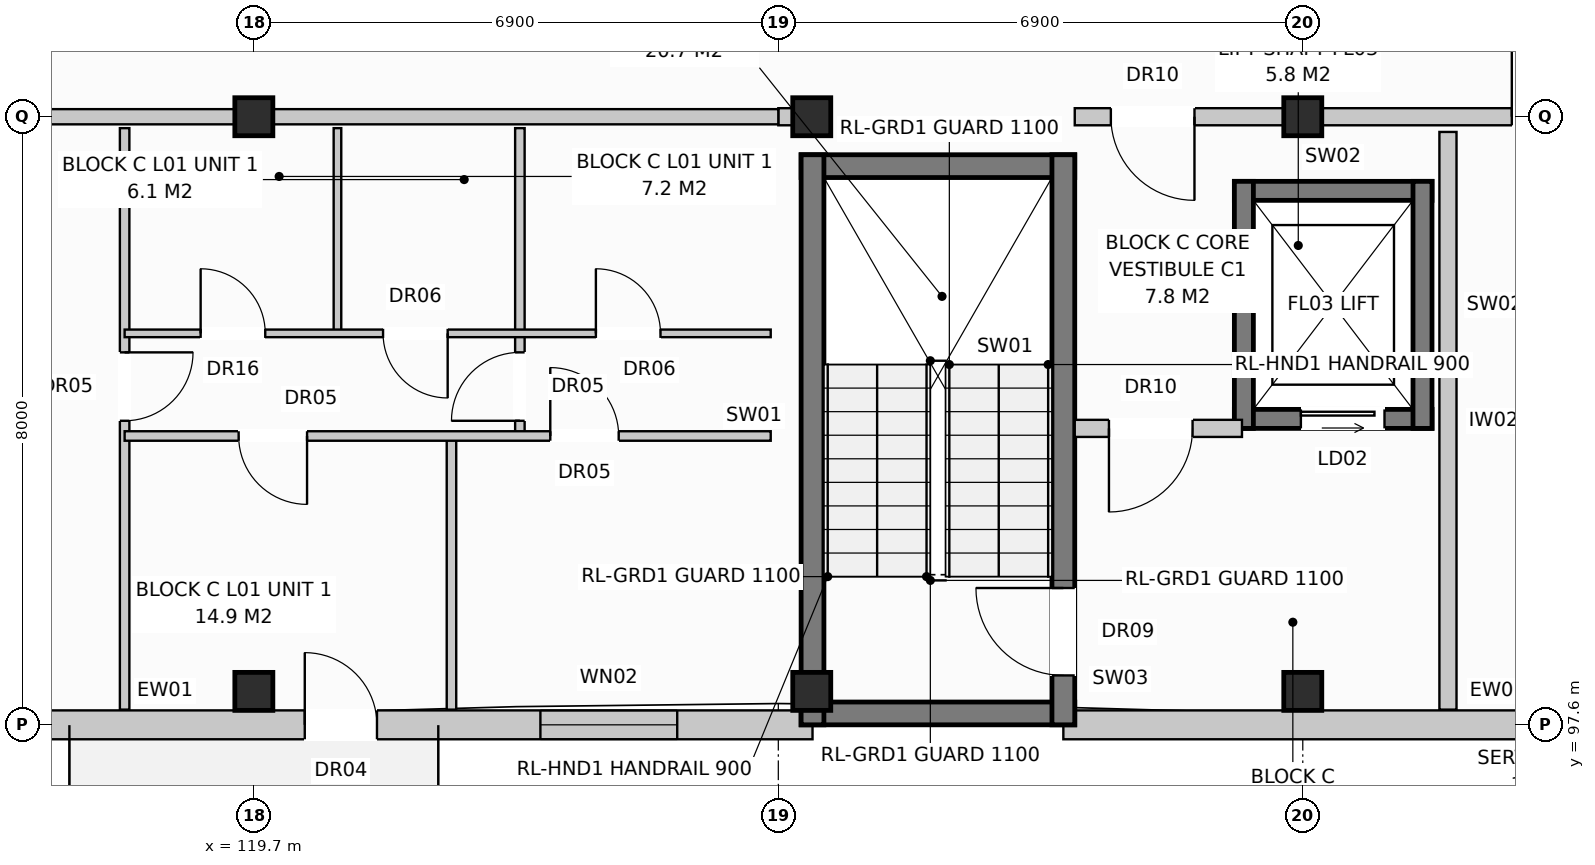
"""IFC4 building model, lengths in metres.
Left out: names, types, materials, properties, quantities, classifications, styles, units other than length and angle.
Written with IfcOpenShell. Run it as: python <this file> out.ifc"""

import sys

from ifc_helpers import new_model, si_unit, direction, frame, frame_2d, origin, origin_with_axes, origin_2d, place, context, subcontext, project, spatial, rectangle, extrude, element, fill, save


model = new_model("IFC4")
c1 = context("Model", 3, precision=1e-05, world=origin(), true_north=direction((0.0, 1.0)))
c2 = subcontext(c1, "Body", "Model", "MODEL_VIEW")
j1 = project(units=[si_unit("LENGTHUNIT", "METRE"), si_unit("PLANEANGLEUNIT", "RADIAN")], contexts=[c1])
p1 = place(None, origin())
s1 = spatial("IfcSite", under=j1, at=p1, CompositionType="ELEMENT")
p2 = place(p1, origin())
s2 = spatial("IfcBuilding", under=s1, at=p2, CompositionType="ELEMENT")
p3 = place(p2, frame((0.0, 0.0, 4.4)))
s3 = spatial("IfcBuildingStorey", under=s2, at=p3, CompositionType="ELEMENT", Elevation=4.4)
for number, where, z_axis, x_axis in (
    (1, (119.7, 98.04, 0.0), (0.0, 0.0, 1.0), (1.0, 0.0, 0.0)),
    (2, (119.7, 105.6, 0.0), (0.0, 0.0, 1.0), (1.0, 0.0, 0.0)),
    (3, (127.04, 98.04, 0.0), (0.0, 0.0, 1.0), (1.0, 0.0, 0.0)),
    (4, (127.04, 105.6, 0.0), (0.0, 0.0, 1.0), (1.0, 0.0, 0.0)),
    (5, (133.5, 98.04, 0.0), (0.0, 0.0, 1.0), (1.0, 0.0, 0.0)),
    (6, (133.5, 105.6, 0.0), (0.0, 0.0, 1.0), (1.0, 0.0, 0.0)),
):
    element("IfcColumn", number, at=place(p3, frame(where, z_axis=z_axis, x_axis=x_axis)), inside=s3, PredefinedType="COLUMN", context=c2, shape_type="SweptSolid", body=[
        extrude(rectangle(XDim=0.5, YDim=0.5, at=origin_2d()), origin(), (0.0, 0.0, 1.0), 3.6),
    ])
p4 = place(p3, frame((112.98, 97.6, 0.0), z_axis=(0.0, 0.0, 1.0), x_axis=(1.0, 0.0, 0.0)))
e7 = element("IfcWall", 7, at=p4, inside=s3, PredefinedType="STANDARD", context=c2, shape_type="SweptSolid", body=[
    extrude(rectangle(XDim=14.07, YDim=0.38, at=frame_2d((7.035, 0.0))), origin(), (0.0, 0.0, 1.0), 3.33),
])
p5 = place(p4, frame((7.39, 0.0, 0.0)))
e8 = element("IfcOpeningElement", 8, at=p5, cuts=e7, PredefinedType="OPENING", context=c2, shape_type="SweptSolid", body=[
    extrude(rectangle(XDim=0.95, YDim=2.1, at=frame_2d((0.475, 1.05))), frame((0.0, 0.202, 0.0), z_axis=(0.0, -1.0, 0.0), x_axis=(1.0, 0.0, 0.0)), (0.0, 0.0, 1.0), 0.404),
])
p6 = place(p4, frame((1.515, 0.0, 0.8)))
e9 = element("IfcOpeningElement", 9, at=p6, cuts=e7, PredefinedType="OPENING", context=c2, shape_type="SweptSolid", body=[
    extrude(rectangle(XDim=1.95, YDim=1.65, at=frame_2d((0.975, 0.825))), frame((0.0, 0.202, 0.0), z_axis=(0.0, -1.0, 0.0), x_axis=(1.0, 0.0, 0.0)), (0.0, 0.0, 1.0), 0.404),
])
p7 = place(p4, frame((10.49, 0.0, 0.8)))
e10 = element("IfcOpeningElement", 10, at=p7, cuts=e7, PredefinedType="OPENING", context=c2, shape_type="SweptSolid", body=[
    extrude(rectangle(XDim=1.8, YDim=1.7, at=frame_2d((0.9, 0.85))), frame((0.0, 0.202, 0.0), z_axis=(0.0, -1.0, 0.0), x_axis=(1.0, 0.0, 0.0)), (0.0, 0.0, 1.0), 0.404),
])
p8 = place(p3, frame((130.35, 97.6, 0.0), z_axis=(0.0, 0.0, 1.0), x_axis=(1.0, 0.0, 0.0)))
e11 = element("IfcWall", 11, at=p8, inside=s3, PredefinedType="STANDARD", context=c2, shape_type="SweptSolid", body=[
    extrude(rectangle(XDim=17.4, YDim=0.38, at=frame_2d((8.7, 0.0))), origin(), (0.0, 0.0, 1.0), 3.33),
])
p9 = place(p8, frame((11.892, 0.0, 0.0)))
e12 = element("IfcOpeningElement", 12, at=p9, cuts=e11, PredefinedType="OPENING", context=c2, shape_type="SweptSolid", body=[
    extrude(rectangle(XDim=0.95, YDim=2.1, at=frame_2d((0.475, 1.05))), frame((0.0, 0.202, 0.0), z_axis=(0.0, -1.0, 0.0), x_axis=(1.0, 0.0, 0.0)), (0.0, 0.0, 1.0), 0.404),
])
p10 = place(p8, frame((10.62, 0.0, 0.9)))
e13 = element("IfcOpeningElement", 13, at=p10, cuts=e11, PredefinedType="OPENING", context=c2, shape_type="SweptSolid", body=[
    extrude(rectangle(XDim=0.95, YDim=1.55, at=frame_2d((0.475, 0.775))), frame((0.0, 0.202, 0.0), z_axis=(0.0, -1.0, 0.0), x_axis=(1.0, 0.0, 0.0)), (0.0, 0.0, 1.0), 0.404),
])
p11 = place(p8, frame((14.548, 0.0, 0.8)))
e14 = element("IfcOpeningElement", 14, at=p11, cuts=e11, PredefinedType="OPENING", context=c2, shape_type="SweptSolid", body=[
    extrude(rectangle(XDim=1.95, YDim=1.65, at=frame_2d((0.975, 0.825))), frame((0.0, 0.202, 0.0), z_axis=(0.0, -1.0, 0.0), x_axis=(1.0, 0.0, 0.0)), (0.0, 0.0, 1.0), 0.404),
])
for number, where, z_axis, x_axis in (
    (15, (126.9, 97.75, 0.0), (0.0, 0.0, 1.0), (1.0, 0.0, 0.0)),
    (16, (126.9, 104.95, 0.0), (0.0, 0.0, 1.0), (1.0, 0.0, 0.0)),
):
    element("IfcWall", number, at=place(p3, frame(where, z_axis=z_axis, x_axis=x_axis)), inside=s3, PredefinedType="SHEAR", context=c2, shape_type="SweptSolid", body=[
        extrude(rectangle(XDim=3.6, YDim=0.3, at=frame_2d((1.8, 0.0))), origin(), (0.0, 0.0, 1.0), 3.33),
    ])
p12 = place(p3, frame((127.05, 97.6, 0.0), z_axis=(0.0, 0.0, 1.0), x_axis=(0.0, 1.0, 0.0)))
e17 = element("IfcWall", 17, at=p12, inside=s3, PredefinedType="SHEAR", context=c2, shape_type="SweptSolid", body=[
    extrude(rectangle(XDim=7.5, YDim=0.3, at=frame_2d((3.75, 0.0))), origin(), (0.0, 0.0, 1.0), 3.33),
])
p13 = place(p3, frame((130.35, 97.6, 0.0), z_axis=(0.0, 0.0, 1.0), x_axis=(0.0, 1.0, 0.0)))
e18 = element("IfcWall", 18, at=p13, inside=s3, PredefinedType="SHEAR", context=c2, shape_type="SweptSolid", body=[
    extrude(rectangle(XDim=7.5, YDim=0.3, at=frame_2d((3.75, 0.0))), origin(), (0.0, 0.0, 1.0), 3.33),
])
p14 = place(p13, frame((0.65, 0.0, 0.0)))
e19 = element("IfcOpeningElement", 19, at=p14, cuts=e18, PredefinedType="OPENING", context=c2, shape_type="SweptSolid", body=[
    extrude(rectangle(XDim=1.15, YDim=2.15, at=frame_2d((0.575, 1.075))), frame((0.0, 0.162, 0.0), z_axis=(0.0, -1.0, 0.0), x_axis=(1.0, 0.0, 0.0)), (0.0, 0.0, 1.0), 0.324),
])
p15 = place(p3, frame((132.6, 101.625, 0.0), z_axis=(0.0, 0.0, 1.0), x_axis=(1.0, 0.0, 0.0)))
e20 = element("IfcWall", 20, at=p15, inside=s3, PredefinedType="SHEAR", context=c2, shape_type="SweptSolid", body=[
    extrude(rectangle(XDim=2.6, YDim=0.25, at=frame_2d((1.3, 0.0))), origin(), (0.0, 0.0, 1.0), 3.33),
])
p16 = place(p15, frame((0.875, 0.0, 0.0)))
e21 = element("IfcOpeningElement", 21, at=p16, cuts=e20, PredefinedType="OPENING", context=c2, shape_type="SweptSolid", body=[
    extrude(rectangle(XDim=1.1, YDim=2.1, at=frame_2d((0.55, 1.05))), frame((0.0, 0.137, 0.0), z_axis=(0.0, -1.0, 0.0), x_axis=(1.0, 0.0, 0.0)), (0.0, 0.0, 1.0), 0.274),
])
p17 = place(p3, frame((132.6, 104.625, 0.0), z_axis=(0.0, 0.0, 1.0), x_axis=(1.0, 0.0, 0.0)))
e22 = element("IfcWall", 22, at=p17, inside=s3, PredefinedType="SHEAR", context=c2, shape_type="SweptSolid", body=[
    extrude(rectangle(XDim=2.6, YDim=0.25, at=frame_2d((1.3, 0.0))), origin(), (0.0, 0.0, 1.0), 3.33),
])
for number, where, z_axis, x_axis in (
    (23, (132.725, 101.5, 0.0), (0.0, 0.0, 1.0), (0.0, 1.0, 0.0)),
    (24, (135.075, 101.5, 0.0), (0.0, 0.0, 1.0), (0.0, 1.0, 0.0)),
):
    element("IfcWall", number, at=place(p3, frame(where, z_axis=z_axis, x_axis=x_axis)), inside=s3, PredefinedType="SHEAR", context=c2, shape_type="SweptSolid", body=[
        extrude(rectangle(XDim=3.25, YDim=0.25, at=frame_2d((1.625, 0.0))), origin(), (0.0, 0.0, 1.0), 3.33),
    ])
p18 = place(p3, frame((135.41, 97.8, 0.0), z_axis=(0.0, 0.0, 1.0), x_axis=(0.0, 1.0, 0.0)))
e25 = element("IfcWall", 25, at=p18, inside=s3, PredefinedType="PARTITIONING", context=c2, shape_type="SweptSolid", body=[
    extrude(rectangle(XDim=7.6, YDim=0.225, at=frame_2d((3.8, 0.0))), origin(), (0.0, 0.0, 1.0), 2.99),
])
p19 = place(p3, frame((130.5, 101.5, 0.0), z_axis=(0.0, 0.0, 1.0), x_axis=(1.0, 0.0, 0.0)))
e26 = element("IfcWall", 26, at=p19, inside=s3, PredefinedType="PARTITIONING", context=c2, shape_type="SweptSolid", body=[
    extrude(rectangle(XDim=2.2, YDim=0.225, at=frame_2d((1.1, 0.0))), origin(), (0.0, 0.0, 1.0), 3.33),
])
p20 = place(p19, frame((0.45, 0.0, 0.0)))
e27 = element("IfcOpeningElement", 27, at=p20, cuts=e26, PredefinedType="OPENING", context=c2, shape_type="SweptSolid", body=[
    extrude(rectangle(XDim=1.1, YDim=2.15, at=frame_2d((0.55, 1.075))), frame((0.0, 0.125, 0.0), z_axis=(0.0, -1.0, 0.0), x_axis=(1.0, 0.0, 0.0)), (0.0, 0.0, 1.0), 0.249),
])
p21 = place(p3, frame((126.6, 105.6, 0.0), z_axis=(0.0, 0.0, 1.0), x_axis=(1.0, 0.0, 0.0)))
e28 = element("IfcWall", 28, at=p21, inside=s3, PredefinedType="PARTITIONING", context=c2, shape_type="SweptSolid", body=[
    extrude(rectangle(XDim=0.3, YDim=0.225, at=frame_2d((0.15, 0.0))), origin(), (0.0, 0.0, 1.0), 3.33),
])
p22 = place(p3, frame((130.5, 105.6, 0.0), z_axis=(0.0, 0.0, 1.0), x_axis=(1.0, 0.0, 0.0)))
e29 = element("IfcWall", 29, at=p22, inside=s3, PredefinedType="PARTITIONING", context=c2, shape_type="SweptSolid", body=[
    extrude(rectangle(XDim=9.9, YDim=0.225, at=frame_2d((4.95, 0.0))), origin(), (0.0, 0.0, 1.0), 2.77),
])
p23 = place(p22, frame((0.475, 0.0, 0.0)))
e30 = element("IfcOpeningElement", 30, at=p23, cuts=e29, PredefinedType="OPENING", context=c2, shape_type="SweptSolid", body=[
    extrude(rectangle(XDim=1.1, YDim=2.15, at=frame_2d((0.55, 1.075))), frame((0.0, 0.125, 0.0), z_axis=(0.0, -1.0, 0.0), x_axis=(1.0, 0.0, 0.0)), (0.0, 0.0, 1.0), 0.249),
])
p24 = place(p22, frame((5.75, 0.0, 0.0)))
e31 = element("IfcOpeningElement", 31, at=p24, cuts=e29, PredefinedType="OPENING", context=c2, shape_type="SweptSolid", body=[
    extrude(rectangle(XDim=0.9, YDim=2.1, at=frame_2d((0.45, 1.05))), frame((0.0, 0.125, 0.0), z_axis=(0.0, -1.0, 0.0), x_axis=(1.0, 0.0, 0.0)), (0.0, 0.0, 1.0), 0.249),
])
p25 = place(p22, frame((7.8, 0.0, 0.0)))
e32 = element("IfcOpeningElement", 32, at=p25, cuts=e29, PredefinedType="OPENING", context=c2, shape_type="SweptSolid", body=[
    extrude(rectangle(XDim=0.95, YDim=2.15, at=frame_2d((0.475, 1.075))), frame((0.0, 0.125, 0.0), z_axis=(0.0, -1.0, 0.0), x_axis=(1.0, 0.0, 0.0)), (0.0, 0.0, 1.0), 0.249),
])
p26 = place(p3, frame((112.8, 105.6, 0.0), z_axis=(0.0, 0.0, 1.0), x_axis=(1.0, 0.0, 0.0)))
e33 = element("IfcWall", 33, at=p26, inside=s3, PredefinedType="PARTITIONING", context=c2, shape_type="SweptSolid", body=[
    extrude(rectangle(XDim=13.8, YDim=0.2, at=frame_2d((6.9, 0.0))), origin(), (0.0, 0.0, 1.0), 2.77),
])
p27 = place(p26, frame((2.4, 0.0, 0.0)))
e34 = element("IfcOpeningElement", 34, at=p27, cuts=e33, PredefinedType="OPENING", context=c2, shape_type="SweptSolid", body=[
    extrude(rectangle(XDim=0.95, YDim=2.15, at=frame_2d((0.475, 1.075))), frame((0.0, 0.112, 0.0), z_axis=(0.0, -1.0, 0.0), x_axis=(1.0, 0.0, 0.0)), (0.0, 0.0, 1.0), 0.224),
])
p28 = place(p3, frame((118.0, 105.45, 0.0), z_axis=(0.0, 0.0, 1.0), x_axis=(0.0, -1.0, 0.0)))
e35 = element("IfcWall", 35, at=p28, inside=s3, PredefinedType="PARTITIONING", context=c2, shape_type="SweptSolid", body=[
    extrude(rectangle(XDim=7.65, YDim=0.125, at=frame_2d((3.825, 0.0))), origin(), (0.0, 0.0, 1.0), 3.33),
])
p29 = place(p28, frame((2.95, 0.0, 0.0)))
e36 = element("IfcOpeningElement", 36, at=p29, cuts=e35, PredefinedType="OPENING", context=c2, shape_type="SweptSolid", body=[
    extrude(rectangle(XDim=0.9, YDim=2.1, at=frame_2d((0.45, 1.05))), frame((0.0, 0.074, 0.0), z_axis=(0.0, -1.0, 0.0), x_axis=(1.0, 0.0, 0.0)), (0.0, 0.0, 1.0), 0.149),
])
p30 = place(p3, frame((120.8, 105.45, 0.0), z_axis=(0.0, 0.0, 1.0), x_axis=(0.0, -1.0, 0.0)))
e37 = element("IfcWall", 37, at=p30, inside=s3, PredefinedType="PARTITIONING", context=c2, shape_type="SweptSolid", body=[
    extrude(rectangle(XDim=2.7, YDim=0.1, at=frame_2d((1.35, 0.0))), origin(), (0.0, 0.0, 1.0), 3.33),
])
p31 = place(p3, frame((123.2, 105.45, 0.0), z_axis=(0.0, 0.0, 1.0), x_axis=(0.0, -1.0, 0.0)))
e38 = element("IfcWall", 38, at=p31, inside=s3, PredefinedType="PARTITIONING", context=c2, shape_type="SweptSolid", body=[
    extrude(rectangle(XDim=4.05, YDim=0.125, at=frame_2d((2.025, 0.0))), origin(), (0.0, 0.0, 1.0), 2.99),
])
p32 = place(p31, frame((2.95, 0.0, 0.0)))
e39 = element("IfcOpeningElement", 39, at=p32, cuts=e38, PredefinedType="OPENING", context=c2, shape_type="SweptSolid", body=[
    extrude(rectangle(XDim=0.9, YDim=2.1, at=frame_2d((0.45, 1.05))), frame((0.0, 0.074, 0.0), z_axis=(0.0, -1.0, 0.0), x_axis=(1.0, 0.0, 0.0)), (0.0, 0.0, 1.0), 0.149),
])
p33 = place(p3, frame((122.3, 101.4, 0.0), z_axis=(0.0, 0.0, 1.0), x_axis=(0.0, -1.0, 0.0)))
e40 = element("IfcWall", 40, at=p33, inside=s3, PredefinedType="PARTITIONING", context=c2, shape_type="SweptSolid", body=[
    extrude(rectangle(XDim=3.6, YDim=0.125, at=frame_2d((1.8, 0.0))), origin(), (0.0, 0.0, 1.0), 3.33),
])
p34 = place(p3, frame((118.0, 102.75, 0.0), z_axis=(0.0, 0.0, 1.0), x_axis=(1.0, 0.0, 0.0)))
e41 = element("IfcWall", 41, at=p34, inside=s3, PredefinedType="PARTITIONING", context=c2, shape_type="SweptSolid", body=[
    extrude(rectangle(XDim=8.5, YDim=0.1, at=frame_2d((4.25, 0.0))), origin(), (0.0, 0.0, 1.0), 3.33),
])
p35 = place(p34, frame((1.0, 0.0, 0.0)))
e42 = element("IfcOpeningElement", 42, at=p35, cuts=e41, PredefinedType="OPENING", context=c2, shape_type="SweptSolid", body=[
    extrude(rectangle(XDim=0.85, YDim=2.1, at=frame_2d((0.425, 1.05))), frame((0.0, 0.062, 0.0), z_axis=(0.0, -1.0, 0.0), x_axis=(1.0, 0.0, 0.0)), (0.0, 0.0, 1.0), 0.124),
])
p36 = place(p34, frame((3.4, 0.0, 0.0)))
e43 = element("IfcOpeningElement", 43, at=p36, cuts=e41, PredefinedType="OPENING", context=c2, shape_type="SweptSolid", body=[
    extrude(rectangle(XDim=0.85, YDim=2.05, at=frame_2d((0.425, 1.025))), frame((0.0, 0.062, 0.0), z_axis=(0.0, -1.0, 0.0), x_axis=(1.0, 0.0, 0.0)), (0.0, 0.0, 1.0), 0.124),
])
p37 = place(p34, frame((6.2, 0.0, 0.0)))
e44 = element("IfcOpeningElement", 44, at=p37, cuts=e41, PredefinedType="OPENING", context=c2, shape_type="SweptSolid", body=[
    extrude(rectangle(XDim=0.85, YDim=2.05, at=frame_2d((0.425, 1.025))), frame((0.0, 0.062, 0.0), z_axis=(0.0, -1.0, 0.0), x_axis=(1.0, 0.0, 0.0)), (0.0, 0.0, 1.0), 0.124),
])
p38 = place(p3, frame((118.0, 101.4, 0.0), z_axis=(0.0, 0.0, 1.0), x_axis=(1.0, 0.0, 0.0)))
e45 = element("IfcWall", 45, at=p38, inside=s3, PredefinedType="PARTITIONING", context=c2, shape_type="SweptSolid", body=[
    extrude(rectangle(XDim=8.5, YDim=0.125, at=frame_2d((4.25, 0.0))), origin(), (0.0, 0.0, 1.0), 3.33),
])
p39 = place(p38, frame((1.5, 0.0, 0.0)))
e46 = element("IfcOpeningElement", 46, at=p39, cuts=e45, PredefinedType="OPENING", context=c2, shape_type="SweptSolid", body=[
    extrude(rectangle(XDim=0.9, YDim=2.1, at=frame_2d((0.45, 1.05))), frame((0.0, 0.074, 0.0), z_axis=(0.0, -1.0, 0.0), x_axis=(1.0, 0.0, 0.0)), (0.0, 0.0, 1.0), 0.149),
])
p40 = place(p38, frame((5.6, 0.0, 0.0)))
e47 = element("IfcOpeningElement", 47, at=p40, cuts=e45, PredefinedType="OPENING", context=c2, shape_type="SweptSolid", body=[
    extrude(rectangle(XDim=0.9, YDim=2.1, at=frame_2d((0.45, 1.05))), frame((0.0, 0.074, 0.0), z_axis=(0.0, -1.0, 0.0), x_axis=(1.0, 0.0, 0.0)), (0.0, 0.0, 1.0), 0.149),
])
p41 = place(p5, origin_with_axes())
e48 = element("IfcDoor", 48, at=p41, inside=s3, OperationType="SINGLE_SWING_LEFT", PredefinedType="DOOR", context=c2, shape_type="SweptSolid", body=[
    extrude(rectangle(XDim=0.95, YDim=2.1, at=frame_2d((0.475, 1.05))), frame((0.0, 0.025, 0.0), z_axis=(0.0, -1.0, 0.0), x_axis=(1.0, 0.0, 0.0)), (0.0, 0.0, 1.0), 0.05),
])
fill(e8, e48)
p42 = place(p7, origin_with_axes())
e49 = element("IfcWindow", 49, at=p42, inside=s3, PartitioningType="SINGLE_PANEL", PredefinedType="WINDOW", context=c2, shape_type="SweptSolid", body=[
    extrude(rectangle(XDim=1.8, YDim=1.7, at=frame_2d((0.9, 0.85))), frame((0.0, 0.03, 0.0), z_axis=(0.0, -1.0, 0.0), x_axis=(1.0, 0.0, 0.0)), (0.0, 0.0, 1.0), 0.06),
])
fill(e10, e49)
p43 = place(p14, origin_with_axes())
e50 = element("IfcDoor", 50, at=p43, inside=s3, OperationType="SINGLE_SWING_RIGHT", PredefinedType="DOOR", context=c2, shape_type="SweptSolid", body=[
    extrude(rectangle(XDim=1.15, YDim=2.15, at=frame_2d((0.575, 1.075))), frame((0.0, 0.025, 0.0), z_axis=(0.0, -1.0, 0.0), x_axis=(1.0, 0.0, 0.0)), (0.0, 0.0, 1.0), 0.05),
])
fill(e19, e50)
p44 = place(p16, origin_with_axes())
e51 = element("IfcDoor", 51, at=p44, inside=s3, OperationType="SLIDING_TO_LEFT", PredefinedType="DOOR", context=c2, shape_type="SweptSolid", body=[
    extrude(rectangle(XDim=1.1, YDim=2.1, at=frame_2d((0.55, 1.05))), frame((0.0, 0.025, 0.0), z_axis=(0.0, -1.0, 0.0), x_axis=(1.0, 0.0, 0.0)), (0.0, 0.0, 1.0), 0.05),
])
fill(e21, e51)
p45 = place(p20, frame((1.1, 0.0, 0.0), z_axis=(0.0, 0.0, 1.0), x_axis=(-1.0, 0.0, 0.0)))
e52 = element("IfcDoor", 52, at=p45, inside=s3, OperationType="SINGLE_SWING_LEFT", PredefinedType="DOOR", context=c2, shape_type="SweptSolid", body=[
    extrude(rectangle(XDim=1.1, YDim=2.15, at=frame_2d((0.55, 1.075))), frame((0.0, 0.025, 0.0), z_axis=(0.0, -1.0, 0.0), x_axis=(1.0, 0.0, 0.0)), (0.0, 0.0, 1.0), 0.05),
])
fill(e27, e52)
p46 = place(p23, frame((1.1, 0.0, 0.0), z_axis=(0.0, 0.0, 1.0), x_axis=(-1.0, 0.0, 0.0)))
e53 = element("IfcDoor", 53, at=p46, inside=s3, OperationType="SINGLE_SWING_RIGHT", PredefinedType="DOOR", context=c2, shape_type="SweptSolid", body=[
    extrude(rectangle(XDim=1.1, YDim=2.15, at=frame_2d((0.55, 1.075))), frame((0.0, 0.025, 0.0), z_axis=(0.0, -1.0, 0.0), x_axis=(1.0, 0.0, 0.0)), (0.0, 0.0, 1.0), 0.05),
])
fill(e30, e53)
p47 = place(p24, origin_with_axes())
e54 = element("IfcDoor", 54, at=p47, inside=s3, OperationType="SINGLE_SWING_LEFT", PredefinedType="DOOR", context=c2, shape_type="SweptSolid", body=[
    extrude(rectangle(XDim=0.9, YDim=2.1, at=frame_2d((0.45, 1.05))), frame((0.0, 0.025, 0.0), z_axis=(0.0, -1.0, 0.0), x_axis=(1.0, 0.0, 0.0)), (0.0, 0.0, 1.0), 0.05),
])
fill(e31, e54)
p48 = place(p29, origin_with_axes())
e55 = element("IfcDoor", 55, at=p48, inside=s3, OperationType="SINGLE_SWING_LEFT", PredefinedType="DOOR", context=c2, shape_type="SweptSolid", body=[
    extrude(rectangle(XDim=0.9, YDim=2.1, at=frame_2d((0.45, 1.05))), frame((0.0, 0.025, 0.0), z_axis=(0.0, -1.0, 0.0), x_axis=(1.0, 0.0, 0.0)), (0.0, 0.0, 1.0), 0.05),
])
fill(e36, e55)
p49 = place(p32, frame((0.9, 0.0, 0.0), z_axis=(0.0, 0.0, 1.0), x_axis=(-1.0, 0.0, 0.0)))
e56 = element("IfcDoor", 56, at=p49, inside=s3, OperationType="SINGLE_SWING_RIGHT", PredefinedType="DOOR", context=c2, shape_type="SweptSolid", body=[
    extrude(rectangle(XDim=0.9, YDim=2.1, at=frame_2d((0.45, 1.05))), frame((0.0, 0.025, 0.0), z_axis=(0.0, -1.0, 0.0), x_axis=(1.0, 0.0, 0.0)), (0.0, 0.0, 1.0), 0.05),
])
fill(e39, e56)
p50 = place(p35, origin_with_axes())
e57 = element("IfcDoor", 57, at=p50, inside=s3, OperationType="SINGLE_SWING_LEFT", PredefinedType="DOOR", context=c2, shape_type="SweptSolid", body=[
    extrude(rectangle(XDim=0.85, YDim=2.1, at=frame_2d((0.425, 1.05))), frame((0.0, 0.025, 0.0), z_axis=(0.0, -1.0, 0.0), x_axis=(1.0, 0.0, 0.0)), (0.0, 0.0, 1.0), 0.05),
])
fill(e42, e57)
p51 = place(p36, frame((0.85, 0.0, 0.0), z_axis=(0.0, 0.0, 1.0), x_axis=(-1.0, 0.0, 0.0)))
e58 = element("IfcDoor", 58, at=p51, inside=s3, OperationType="SINGLE_SWING_RIGHT", PredefinedType="DOOR", context=c2, shape_type="SweptSolid", body=[
    extrude(rectangle(XDim=0.85, YDim=2.05, at=frame_2d((0.425, 1.025))), frame((0.0, 0.025, 0.0), z_axis=(0.0, -1.0, 0.0), x_axis=(1.0, 0.0, 0.0)), (0.0, 0.0, 1.0), 0.05),
])
fill(e43, e58)
p52 = place(p37, origin_with_axes())
e59 = element("IfcDoor", 59, at=p52, inside=s3, OperationType="SINGLE_SWING_LEFT", PredefinedType="DOOR", context=c2, shape_type="SweptSolid", body=[
    extrude(rectangle(XDim=0.85, YDim=2.05, at=frame_2d((0.425, 1.025))), frame((0.0, 0.025, 0.0), z_axis=(0.0, -1.0, 0.0), x_axis=(1.0, 0.0, 0.0)), (0.0, 0.0, 1.0), 0.05),
])
fill(e44, e59)
p53 = place(p39, frame((0.9, 0.0, 0.0), z_axis=(0.0, 0.0, 1.0), x_axis=(-1.0, 0.0, 0.0)))
e60 = element("IfcDoor", 60, at=p53, inside=s3, OperationType="SINGLE_SWING_RIGHT", PredefinedType="DOOR", context=c2, shape_type="SweptSolid", body=[
    extrude(rectangle(XDim=0.9, YDim=2.1, at=frame_2d((0.45, 1.05))), frame((0.0, 0.025, 0.0), z_axis=(0.0, -1.0, 0.0), x_axis=(1.0, 0.0, 0.0)), (0.0, 0.0, 1.0), 0.05),
])
fill(e46, e60)
p54 = place(p40, origin_with_axes())
e61 = element("IfcDoor", 61, at=p54, inside=s3, OperationType="SINGLE_SWING_LEFT", PredefinedType="DOOR", context=c2, shape_type="SweptSolid", body=[
    extrude(rectangle(XDim=0.9, YDim=2.1, at=frame_2d((0.45, 1.05))), frame((0.0, 0.025, 0.0), z_axis=(0.0, -1.0, 0.0), x_axis=(1.0, 0.0, 0.0)), (0.0, 0.0, 1.0), 0.05),
])
fill(e47, e61)
save(model, sys.argv[1])
